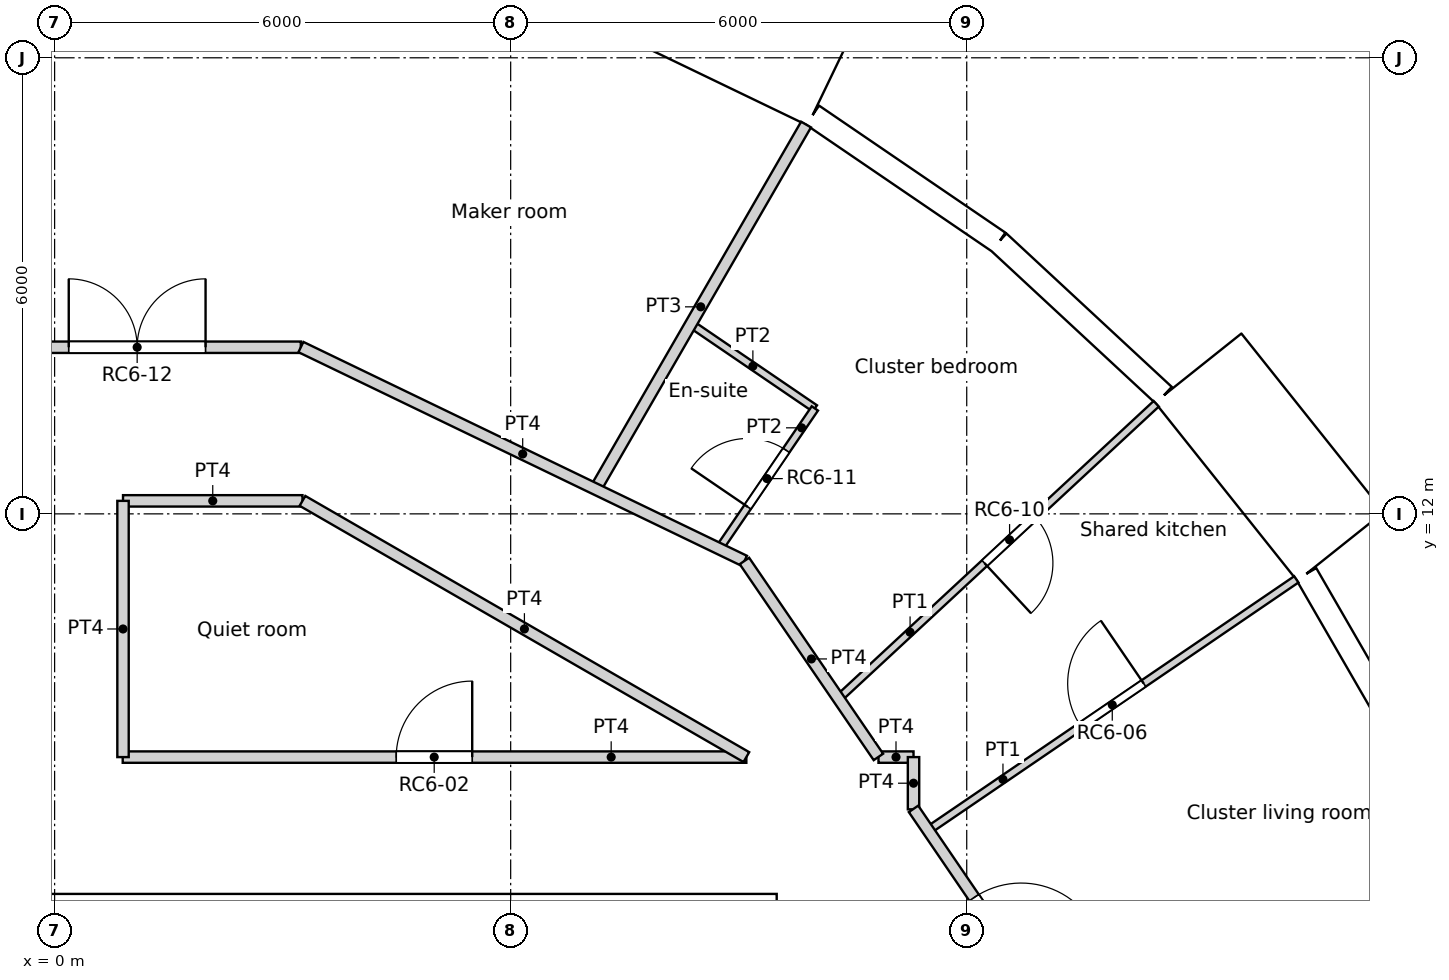
"""IFC4 building model, lengths in metres.
Left out: names, types, materials, properties, quantities, classifications, styles, units other than length and angle.
Written with IfcOpenShell. Run it as: python <this file> out.ifc"""

import sys

from ifc_helpers import new_model, si_unit, direction, frame, frame_2d, origin, origin_2d, place, context, subcontext, project, spatial, rectangle, circle, extrude, element, fill, save


model = new_model("IFC4")
c1 = context("Model", 3, precision=1e-05, world=origin(), true_north=direction((0.0, 1.0)))
c2 = subcontext(c1, "Body", "Model", "MODEL_VIEW")
j1 = project(units=[si_unit("LENGTHUNIT", "METRE"), si_unit("PLANEANGLEUNIT", "RADIAN")], contexts=[c1])
p1 = place(None, origin())
s1 = spatial("IfcSite", under=j1, at=p1, CompositionType="ELEMENT")
p2 = place(p1, origin())
s2 = spatial("IfcBuilding", under=s1, at=p2, CompositionType="ELEMENT")
p3 = place(p2, frame((0.0, 0.0, 283.8)))
s3 = spatial("IfcBuildingStorey", under=s2, at=p3, CompositionType="ELEMENT", Elevation=283.8)
for number, where, z_axis, x_axis in (
    (1, (15.552, 10.603, 0.0), (0.0, 0.0, 1.0), (1.0, 0.0, 0.0)),
    (2, (11.735, 14.716, 0.0), (0.0, 0.0, 1.0), (1.0, 0.0, 0.0)),
    (3, (6.876, 17.521, 0.0), (0.0, 0.0, 1.0), (1.0, 0.0, 0.0)),
):
    element("IfcColumn", number, at=place(p3, frame(where, z_axis=z_axis, x_axis=x_axis)), inside=s3, PredefinedType="COLUMN", context=c2, shape_type="SweptSolid", body=[
        extrude(circle(Radius=0.45, at=origin_2d()), origin(), (0.0, 0.0, 1.0), 3.6),
    ])
p4 = place(p3, frame((17.949, 8.644, 0.0), z_axis=(0.0, 0.0, 1.0), x_axis=(-0.500012570604, 0.866018146021, 0.0)))
e4 = element("IfcWall", 4, at=p4, inside=s3, PredefinedType="SOLIDWALL", context=c2, shape_type="SweptSolid", body=[
    extrude(rectangle(XDim=2.962, YDim=0.3, at=frame_2d((1.481, 0.0))), origin(), (0.0, 0.0, 1.0), 3.25),
])
p5 = place(p4, frame((1.481, 0.0, 1.55)))
e5 = element("IfcOpeningElement", 5, at=p5, cuts=e4, PredefinedType="OPENING", context=c2, shape_type="SweptSolid", body=[
    extrude(circle(Radius=0.9, at=origin_2d()), frame((0.0, 0.16, 0.0), z_axis=(0.0, -1.0, 0.0), x_axis=(1.0, 0.0, 0.0)), (0.0, 0.0, 1.0), 0.32),
])
p6 = place(p3, frame((16.917, 11.572, -0.35), z_axis=(0.0, 0.0, 1.0), x_axis=(-0.623523286312, 0.781804778335, 0.0)))
e6 = element("IfcWall", 6, at=p6, inside=s3, PredefinedType="ELEMENTEDWALL", context=c2, shape_type="SweptSolid", body=[
    extrude(rectangle(XDim=3.0, YDim=1.45, at=frame_2d((1.5, 0.0))), origin(), (0.0, 0.0, 1.0), 3.6),
])
p7 = place(p6, frame((1.5, 0.0, 1.9)))
e7 = element("IfcOpeningElement", 7, at=p7, cuts=e6, PredefinedType="OPENING", context=c2, shape_type="SweptSolid", body=[
    extrude(circle(Radius=0.9, at=origin_2d()), frame((0.0, 0.735, 0.0), z_axis=(0.0, -1.0, 0.0), x_axis=(1.0, 0.0, 0.0)), (0.0, 0.0, 1.0), 1.47),
])
p8 = place(p3, frame((14.593, 13.561, 0.0), z_axis=(0.0, 0.0, 1.0), x_axis=(-0.733028283666, 0.680198158882, 0.0)))
e8 = element("IfcWall", 8, at=p8, inside=s3, PredefinedType="SOLIDWALL", context=c2, shape_type="SweptSolid", body=[
    extrude(rectangle(XDim=2.962, YDim=0.3, at=frame_2d((1.481, 0.0))), origin(), (0.0, 0.0, 1.0), 3.25),
])
p9 = place(p8, frame((1.481, 0.0, 1.55)))
e9 = element("IfcOpeningElement", 9, at=p9, cuts=e8, PredefinedType="OPENING", context=c2, shape_type="SweptSolid", body=[
    extrude(circle(Radius=0.9, at=origin_2d()), frame((0.0, 0.16, 0.0), z_axis=(0.0, -1.0, 0.0), x_axis=(1.0, 0.0, 0.0)), (0.0, 0.0, 1.0), 0.32),
])
p10 = place(p3, frame((12.421, 15.575, 0.0), z_axis=(0.0, 0.0, 1.0), x_axis=(-0.826236061068, 0.563324037646, 0.0)))
e10 = element("IfcWall", 10, at=p10, inside=s3, PredefinedType="SOLIDWALL", context=c2, shape_type="SweptSolid", body=[
    extrude(rectangle(XDim=2.962, YDim=0.3, at=frame_2d((1.481, 0.0))), origin(), (0.0, 0.0, 1.0), 3.25),
])
p11 = place(p10, frame((1.481, 0.0, 1.55)))
e11 = element("IfcOpeningElement", 11, at=p11, cuts=e10, PredefinedType="OPENING", context=c2, shape_type="SweptSolid", body=[
    extrude(circle(Radius=0.9, at=origin_2d()), frame((0.0, 0.16, 0.0), z_axis=(0.0, -1.0, 0.0), x_axis=(1.0, 0.0, 0.0)), (0.0, 0.0, 1.0), 0.32),
])
p12 = place(p3, frame((10.22, 17.766, -0.35), z_axis=(0.0, 0.0, 1.0), x_axis=(-0.900953362039, 0.433915935904, 0.0)))
e12 = element("IfcWall", 12, at=p12, inside=s3, PredefinedType="ELEMENTEDWALL", context=c2, shape_type="SweptSolid", body=[
    extrude(rectangle(XDim=3.0, YDim=1.45, at=frame_2d((1.5, 0.0))), origin(), (0.0, 0.0, 1.0), 3.6),
])
p13 = place(p12, frame((1.5, 0.0, 1.9)))
e13 = element("IfcOpeningElement", 13, at=p13, cuts=e12, PredefinedType="OPENING", context=c2, shape_type="SweptSolid", body=[
    extrude(circle(Radius=0.9, at=origin_2d()), frame((0.0, 0.735, 0.0), z_axis=(0.0, -1.0, 0.0), x_axis=(1.0, 0.0, 0.0)), (0.0, 0.0, 1.0), 1.47),
])
p14 = place(p3, frame((-9.5, 6.7, 0.0), z_axis=(0.0, 0.0, 1.0), x_axis=(1.0, 0.0, 0.0)))
e14 = element("IfcWall", 14, at=p14, inside=s3, PredefinedType="SOLIDWALL", context=c2, shape_type="SweptSolid", body=[
    extrude(rectangle(XDim=19.0, YDim=0.6, at=frame_2d((9.5, 0.0))), origin(), (0.0, 0.0, 1.0), 3.6),
])
p15 = place(p14, frame((5.35, 0.0, 0.0)))
e15 = element("IfcOpeningElement", 15, at=p15, cuts=e14, PredefinedType="OPENING", context=c2, shape_type="SweptSolid", body=[
    extrude(rectangle(XDim=1.7, YDim=2.1, at=frame_2d((0.85, 1.05))), frame((0.0, 0.3, 0.0), z_axis=(0.0, -1.0, 0.0), x_axis=(1.0, 0.0, 0.0)), (0.0, 0.0, 1.0), 0.6),
])
p16 = place(p3, frame((0.896, 8.8, 0.0), z_axis=(0.0, 0.0, 1.0), x_axis=(1.0, 0.0, 0.0)))
e16 = element("IfcWall", 16, at=p16, inside=s3, PredefinedType="PARTITIONING", context=c2, shape_type="SweptSolid", body=[
    extrude(rectangle(XDim=8.205, YDim=0.15, at=frame_2d((4.102, 0.0))), origin(), (0.0, 0.0, 1.0), 3.25),
])
p17 = place(p16, frame((3.598, 0.0, 0.0)))
e17 = element("IfcOpeningElement", 17, at=p17, cuts=e16, PredefinedType="OPENING", context=c2, shape_type="SweptSolid", body=[
    extrude(rectangle(XDim=1.0, YDim=2.04, at=frame_2d((0.5, 1.02))), frame((0.0, 0.075, 0.0), z_axis=(0.0, -1.0, 0.0), x_axis=(1.0, 0.0, 0.0)), (0.0, 0.0, 1.0), 0.15),
])
p18 = place(p3, frame((9.075, 11.381, 0.0), z_axis=(0.0, 0.0, 1.0), x_axis=(0.564277533473, -0.825585165333, 0.0)))
e18 = element("IfcWall", 18, at=p18, inside=s3, PredefinedType="PARTITIONING", context=c2, shape_type="SweptSolid", body=[
    extrude(rectangle(XDim=3.123, YDim=0.15, at=frame_2d((1.562, 0.0))), origin(), (0.0, 0.0, 1.0), 3.25),
])
p19 = place(p3, frame((10.839, 8.8, 0.0), z_axis=(0.0, 0.0, 1.0), x_axis=(1.0, 0.0, 0.0)))
e19 = element("IfcWall", 19, at=p19, inside=s3, PredefinedType="PARTITIONING", context=c2, shape_type="SweptSolid", body=[
    extrude(rectangle(XDim=0.461, YDim=0.15, at=frame_2d((0.23, 0.0))), origin(), (0.0, 0.0, 1.0), 3.25),
])
p20 = place(p3, frame((11.3, 8.113, 0.0), z_axis=(0.0, 0.0, 1.0), x_axis=(0.0, 1.0, 0.0)))
e20 = element("IfcWall", 20, at=p20, inside=s3, PredefinedType="PARTITIONING", context=c2, shape_type="SweptSolid", body=[
    extrude(rectangle(XDim=0.687, YDim=0.15, at=frame_2d((0.344, 0.0))), origin(), (0.0, 0.0, 1.0), 3.25),
])
p21 = place(p3, frame((11.3, 8.119, 0.0), z_axis=(0.0, 0.0, 1.0), x_axis=(0.56348561488, -0.82612587529, 0.0)))
e21 = element("IfcWall", 21, at=p21, inside=s3, PredefinedType="PARTITIONING", context=c2, shape_type="SweptSolid", body=[
    extrude(rectangle(XDim=4.633, YDim=0.15, at=frame_2d((2.316, 0.0))), origin(), (0.0, 0.0, 1.0), 3.25),
])
p22 = place(p21, frame((1.413, 0.0, 0.0)))
e22 = element("IfcOpeningElement", 22, at=p22, cuts=e21, PredefinedType="OPENING", context=c2, shape_type="SweptSolid", body=[
    extrude(rectangle(XDim=1.1, YDim=2.1, at=frame_2d((0.55, 1.05))), frame((0.0, 0.075, 0.0), z_axis=(0.0, -1.0, 0.0), x_axis=(1.0, 0.0, 0.0)), (0.0, 0.0, 1.0), 0.15),
])
p23 = place(p3, frame((3.261, 12.171, 0.0), z_axis=(0.0, 0.0, 1.0), x_axis=(0.866066809554, -0.499928276245, 0.0)))
e23 = element("IfcWall", 23, at=p23, inside=s3, PredefinedType="PARTITIONING", context=c2, shape_type="SweptSolid", body=[
    extrude(rectangle(XDim=6.743, YDim=0.15, at=frame_2d((3.371, 0.0))), origin(), (0.0, 0.0, 1.0), 3.25),
])
p24 = place(p3, frame((0.9, 12.171, 0.0), z_axis=(0.0, 0.0, 1.0), x_axis=(1.0, 0.0, 0.0)))
e24 = element("IfcWall", 24, at=p24, inside=s3, PredefinedType="PARTITIONING", context=c2, shape_type="SweptSolid", body=[
    extrude(rectangle(XDim=2.361, YDim=0.15, at=frame_2d((1.181, 0.0))), origin(), (0.0, 0.0, 1.0), 3.25),
])
p25 = place(p3, frame((0.9, 8.8, 0.0), z_axis=(0.0, 0.0, 1.0), x_axis=(0.0, 1.0, 0.0)))
e25 = element("IfcWall", 25, at=p25, inside=s3, PredefinedType="PARTITIONING", context=c2, shape_type="SweptSolid", body=[
    extrude(rectangle(XDim=3.371, YDim=0.15, at=frame_2d((1.686, 0.0))), origin(), (0.0, 0.0, 1.0), 3.25),
])
p26 = place(p3, frame((3.24, 14.195, 0.0), z_axis=(0.0, 0.0, 1.0), x_axis=(0.900778421649, -0.434278983018, 0.0)))
e26 = element("IfcWall", 26, at=p26, inside=s3, PredefinedType="PARTITIONING", context=c2, shape_type="SweptSolid", body=[
    extrude(rectangle(XDim=6.479, YDim=0.15, at=frame_2d((3.239, 0.0))), origin(), (0.0, 0.0, 1.0), 3.25),
])
p27 = place(p3, frame((-3.239, 14.192, 0.0), z_axis=(0.0, 0.0, 1.0), x_axis=(1.0, 0.0, 0.0)))
e27 = element("IfcWall", 27, at=p27, inside=s3, PredefinedType="PARTITIONING", context=c2, shape_type="SweptSolid", body=[
    extrude(rectangle(XDim=6.478, YDim=0.15, at=frame_2d((3.239, 0.0))), origin(), (0.0, 0.0, 1.0), 3.25),
])
p28 = place(p27, frame((3.425, 0.0, 0.0)))
e28 = element("IfcOpeningElement", 28, at=p28, cuts=e27, PredefinedType="OPENING", context=c2, shape_type="SweptSolid", body=[
    extrude(rectangle(XDim=1.8, YDim=2.1, at=frame_2d((0.9, 1.05))), frame((0.0, 0.075, 0.0), z_axis=(0.0, -1.0, 0.0), x_axis=(1.0, 0.0, 0.0)), (0.0, 0.0, 1.0), 0.15),
])
p29 = place(p3, frame((11.493, 7.836, 0.0), z_axis=(0.0, 0.0, 1.0), x_axis=(0.826231748746, 0.563330362544, 0.0)))
e29 = element("IfcWall", 29, at=p29, inside=s3, PredefinedType="PARTITIONING", context=c2, shape_type="SweptSolid", body=[
    extrude(rectangle(XDim=5.862, YDim=0.1, at=frame_2d((2.931, 0.0))), origin(), (0.0, 0.0, 1.0), 3.25),
])
p30 = place(p29, frame((2.431, 0.0, 0.0)))
e30 = element("IfcOpeningElement", 30, at=p30, cuts=e29, PredefinedType="OPENING", context=c2, shape_type="SweptSolid", body=[
    extrude(rectangle(XDim=1.0, YDim=2.04, at=frame_2d((0.5, 1.02))), frame((0.0, 0.05, 0.0), z_axis=(0.0, -1.0, 0.0), x_axis=(1.0, 0.0, 0.0)), (0.0, 0.0, 1.0), 0.1),
])
p31 = place(p3, frame((10.312, 9.568, 0.0), z_axis=(0.0, 0.0, 1.0), x_axis=(0.733002312561, 0.680226146057, 0.0)))
e31 = element("IfcWall", 31, at=p31, inside=s3, PredefinedType="PARTITIONING", context=c2, shape_type="SweptSolid", body=[
    extrude(rectangle(XDim=5.704, YDim=0.1, at=frame_2d((2.852, 0.0))), origin(), (0.0, 0.0, 1.0), 3.25),
])
p32 = place(p31, frame((2.622, 0.0, 0.0)))
e32 = element("IfcOpeningElement", 32, at=p32, cuts=e31, PredefinedType="OPENING", context=c2, shape_type="SweptSolid", body=[
    extrude(rectangle(XDim=0.9, YDim=2.1, at=frame_2d((0.45, 1.05))), frame((0.0, 0.05, 0.0), z_axis=(0.0, -1.0, 0.0), x_axis=(1.0, 0.0, 0.0)), (0.0, 0.0, 1.0), 0.1),
])
p33 = place(p3, frame((8.743, 11.541, 0.0), z_axis=(0.0, 0.0, 1.0), x_axis=(0.563469042551, 0.826137178734, 0.0)))
e33 = element("IfcWall", 33, at=p33, inside=s3, PredefinedType="PARTITIONING", context=c2, shape_type="SweptSolid", body=[
    extrude(rectangle(XDim=2.234, YDim=0.1, at=frame_2d((1.117, 0.0))), origin(), (0.0, 0.0, 1.0), 3.25),
])
p34 = place(p33, frame((0.667, 0.0, 0.0)))
e34 = element("IfcOpeningElement", 34, at=p34, cuts=e33, PredefinedType="OPENING", context=c2, shape_type="SweptSolid", body=[
    extrude(rectangle(XDim=0.9, YDim=2.04, at=frame_2d((0.45, 1.02))), frame((0.0, 0.05, 0.0), z_axis=(0.0, -1.0, 0.0), x_axis=(1.0, 0.0, 0.0)), (0.0, 0.0, 1.0), 0.1),
])
p35 = place(p3, frame((8.371, 14.499, 0.0), z_axis=(0.0, 0.0, 1.0), x_axis=(0.82620117489, -0.563375202339, 0.0)))
e35 = element("IfcWall", 35, at=p35, inside=s3, PredefinedType="PARTITIONING", context=c2, shape_type="SweptSolid", body=[
    extrude(rectangle(XDim=1.974, YDim=0.1, at=frame_2d((0.987, 0.0))), origin(), (0.0, 0.0, 1.0), 3.25),
])
p36 = place(p3, frame((7.115, 12.325, 0.0), z_axis=(0.0, 0.0, 1.0), x_axis=(0.500139547481, 0.865944821017, 0.0)))
e36 = element("IfcWall", 36, at=p36, inside=s3, PredefinedType="PARTITIONING", context=c2, shape_type="SweptSolid", body=[
    extrude(rectangle(XDim=5.54, YDim=0.15, at=frame_2d((2.77, 0.0))), origin(), (0.0, 0.0, 1.0), 3.25),
])
p37 = place(p5, origin())
e37 = element("IfcWindow", 37, at=p37, inside=s3, PartitioningType="SINGLE_PANEL", PredefinedType="WINDOW", context=c2, shape_type="SweptSolid", body=[
    extrude(circle(Radius=0.9, at=origin_2d()), frame((0.0, 0.12, 0.0), z_axis=(0.0, -1.0, 0.0), x_axis=(1.0, 0.0, 0.0)), (0.0, 0.0, 1.0), 0.1),
])
fill(e5, e37)
p38 = place(p7, origin())
e38 = element("IfcWindow", 38, at=p38, inside=s3, PartitioningType="SINGLE_PANEL", PredefinedType="WINDOW", context=c2, shape_type="SweptSolid", body=[
    extrude(circle(Radius=0.9, at=origin_2d()), frame((0.0, 0.695, 0.0), z_axis=(0.0, -1.0, 0.0), x_axis=(1.0, 0.0, 0.0)), (0.0, 0.0, 1.0), 0.1),
])
fill(e7, e38)
p39 = place(p9, origin())
e39 = element("IfcWindow", 39, at=p39, inside=s3, PartitioningType="SINGLE_PANEL", PredefinedType="WINDOW", context=c2, shape_type="SweptSolid", body=[
    extrude(circle(Radius=0.9, at=origin_2d()), frame((0.0, 0.12, 0.0), z_axis=(0.0, -1.0, 0.0), x_axis=(1.0, 0.0, 0.0)), (0.0, 0.0, 1.0), 0.1),
])
fill(e9, e39)
p40 = place(p11, origin())
e40 = element("IfcWindow", 40, at=p40, inside=s3, PartitioningType="SINGLE_PANEL", PredefinedType="WINDOW", context=c2, shape_type="SweptSolid", body=[
    extrude(circle(Radius=0.9, at=origin_2d()), frame((0.0, 0.12, 0.0), z_axis=(0.0, -1.0, 0.0), x_axis=(1.0, 0.0, 0.0)), (0.0, 0.0, 1.0), 0.1),
])
fill(e11, e40)
p41 = place(p13, origin())
e41 = element("IfcWindow", 41, at=p41, inside=s3, PartitioningType="SINGLE_PANEL", PredefinedType="WINDOW", context=c2, shape_type="SweptSolid", body=[
    extrude(circle(Radius=0.9, at=origin_2d()), frame((0.0, 0.695, 0.0), z_axis=(0.0, -1.0, 0.0), x_axis=(1.0, 0.0, 0.0)), (0.0, 0.0, 1.0), 0.1),
])
fill(e13, e41)
p42 = place(p17, origin())
e42 = element("IfcDoor", 42, at=p42, inside=s3, OperationType="SINGLE_SWING_RIGHT", PredefinedType="DOOR", context=c2, shape_type="SweptSolid", body=[
    extrude(rectangle(XDim=1.0, YDim=2.04, at=frame_2d((0.5, 1.02))), frame((0.0, 0.025, 0.0), z_axis=(0.0, -1.0, 0.0), x_axis=(1.0, 0.0, 0.0)), (0.0, 0.0, 1.0), 0.05),
])
fill(e17, e42)
p43 = place(p22, origin())
e43 = element("IfcDoor", 43, at=p43, inside=s3, OperationType="SINGLE_SWING_RIGHT", PredefinedType="DOOR", context=c2, shape_type="SweptSolid", body=[
    extrude(rectangle(XDim=1.1, YDim=2.1, at=frame_2d((0.55, 1.05))), frame((0.0, 0.025, 0.0), z_axis=(0.0, -1.0, 0.0), x_axis=(1.0, 0.0, 0.0)), (0.0, 0.0, 1.0), 0.05),
])
fill(e22, e43)
p44 = place(p30, origin())
e44 = element("IfcDoor", 44, at=p44, inside=s3, OperationType="SINGLE_SWING_RIGHT", PredefinedType="DOOR", context=c2, shape_type="SweptSolid", body=[
    extrude(rectangle(XDim=1.0, YDim=2.04, at=frame_2d((0.5, 1.02))), frame((0.0, 0.025, 0.0), z_axis=(0.0, -1.0, 0.0), x_axis=(1.0, 0.0, 0.0)), (0.0, 0.0, 1.0), 0.05),
])
fill(e30, e44)
p45 = place(p32, origin())
e45 = element("IfcDoor", 45, at=p45, inside=s3, OperationType="SINGLE_SWING_RIGHT", PredefinedType="DOOR", context=c2, shape_type="SweptSolid", body=[
    extrude(rectangle(XDim=0.9, YDim=2.1, at=frame_2d((0.45, 1.05))), frame((0.0, 0.025, 0.0), z_axis=(0.0, -1.0, 0.0), x_axis=(1.0, 0.0, 0.0)), (0.0, 0.0, 1.0), 0.05),
])
fill(e32, e45)
p46 = place(p34, origin())
e46 = element("IfcDoor", 46, at=p46, inside=s3, OperationType="SINGLE_SWING_LEFT", PredefinedType="DOOR", context=c2, shape_type="SweptSolid", body=[
    extrude(rectangle(XDim=0.9, YDim=2.04, at=frame_2d((0.45, 1.02))), frame((0.0, 0.025, 0.0), z_axis=(0.0, -1.0, 0.0), x_axis=(1.0, 0.0, 0.0)), (0.0, 0.0, 1.0), 0.05),
])
fill(e34, e46)
p47 = place(p28, origin())
e47 = element("IfcDoor", 47, at=p47, inside=s3, OperationType="DOUBLE_DOOR_SINGLE_SWING", PredefinedType="DOOR", context=c2, shape_type="SweptSolid", body=[
    extrude(rectangle(XDim=1.8, YDim=2.1, at=frame_2d((0.9, 1.05))), frame((0.0, 0.025, 0.0), z_axis=(0.0, -1.0, 0.0), x_axis=(1.0, 0.0, 0.0)), (0.0, 0.0, 1.0), 0.05),
])
fill(e28, e47)
save(model, sys.argv[1])
